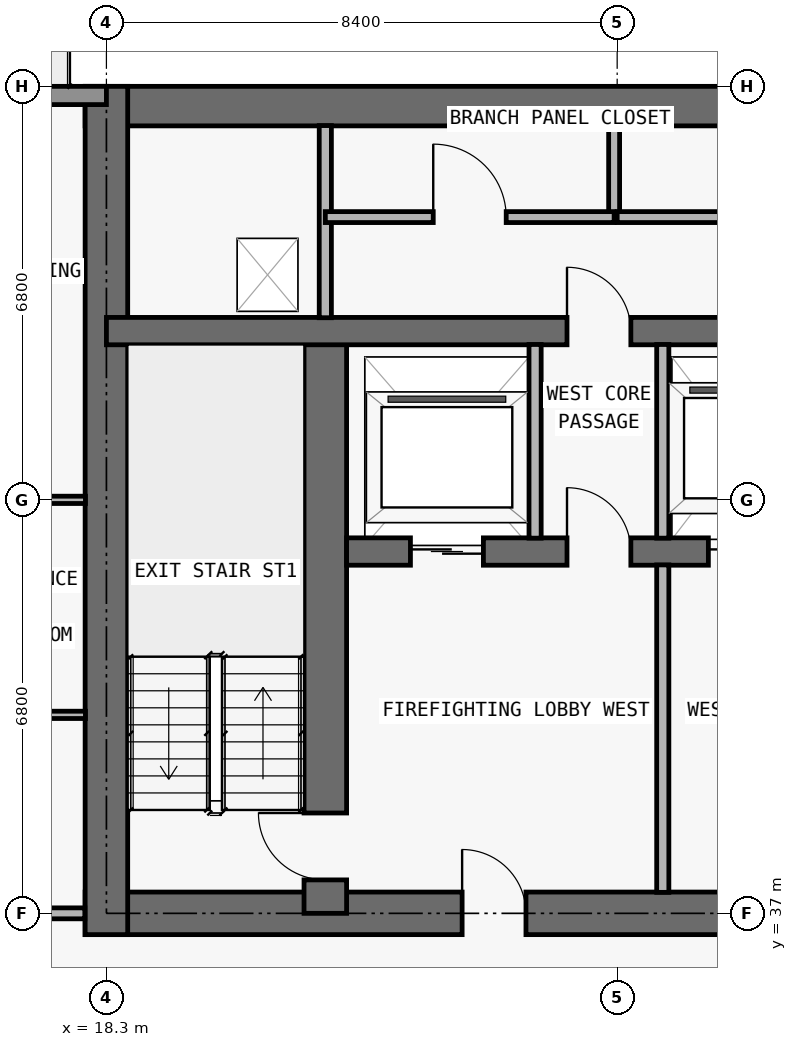
"""IFC4 building model, lengths in metres.
Left out: names, types, materials, properties, quantities, classifications, styles, units other than length and angle.
Written with IfcOpenShell. Run it as: python <this file> out.ifc"""

import sys

from ifc_helpers import new_model, si_unit, direction, frame, frame_2d, origin, place, context, subcontext, project, spatial, rectangle, extrude, element, fill, save


model = new_model("IFC4")
c1 = context("Model", 3, precision=1e-05, world=origin(), true_north=direction((0.0, 1.0)))
c2 = subcontext(c1, "Body", "Model", "MODEL_VIEW")
j1 = project(units=[si_unit("LENGTHUNIT", "METRE"), si_unit("PLANEANGLEUNIT", "RADIAN")], contexts=[c1])
p1 = place(None, origin())
s1 = spatial("IfcSite", under=j1, at=p1, CompositionType="ELEMENT")
p2 = place(p1, origin())
s2 = spatial("IfcBuilding", under=s1, at=p2, CompositionType="ELEMENT")
p3 = place(p2, frame((0.0, 0.0, 229.8)))
s3 = spatial("IfcBuildingStorey", under=s2, at=p3, CompositionType="ELEMENT", Elevation=229.8)
p4 = place(p3, frame((17.95, 37.0, 0.0), z_axis=(0.0, 0.0, 1.0), x_axis=(1.0, 0.0, 0.0)))
e1 = element("IfcWall", 1, at=p4, inside=s3, PredefinedType="SHEAR", context=c2, shape_type="SweptSolid", body=[
    extrude(rectangle(XDim=41.9, YDim=0.7, at=frame_2d((20.95, 0.0))), origin(), (0.0, 0.0, 1.0), 3.05),
])
p5 = place(p4, frame((14.35, 0.0, 0.0)))
e2 = element("IfcOpeningElement", 2, at=p5, cuts=e1, PredefinedType="OPENING", context=c2, shape_type="SweptSolid", body=[
    extrude(rectangle(XDim=1.1, YDim=2.15, at=frame_2d((0.55, 1.075))), frame((0.0, 0.36, 0.0), z_axis=(0.0, -1.0, 0.0), x_axis=(1.0, 0.0, 0.0)), (0.0, 0.0, 1.0), 0.72),
])
p6 = place(p4, frame((6.2, 0.0, 0.0)))
e3 = element("IfcOpeningElement", 3, at=p6, cuts=e1, PredefinedType="OPENING", context=c2, shape_type="SweptSolid", body=[
    extrude(rectangle(XDim=1.05, YDim=2.15, at=frame_2d((0.525, 1.075))), frame((0.0, 0.36, 0.0), z_axis=(0.0, -1.0, 0.0), x_axis=(1.0, 0.0, 0.0)), (0.0, 0.0, 1.0), 0.72),
])
p7 = place(p4, frame((34.7, 0.0, 0.0)))
e4 = element("IfcOpeningElement", 4, at=p7, cuts=e1, PredefinedType="OPENING", context=c2, shape_type="SweptSolid", body=[
    extrude(rectangle(XDim=1.05, YDim=2.15, at=frame_2d((0.525, 1.075))), frame((0.0, 0.36, 0.0), z_axis=(0.0, -1.0, 0.0), x_axis=(1.0, 0.0, 0.0)), (0.0, 0.0, 1.0), 0.72),
])
p8 = place(p4, frame((10.812, 0.0, 0.0)))
e5 = element("IfcOpeningElement", 5, at=p8, cuts=e1, PredefinedType="OPENING", context=c2, shape_type="SweptSolid", body=[
    extrude(rectangle(XDim=1.05, YDim=2.15, at=frame_2d((0.525, 1.075))), frame((0.0, 0.36, 0.0), z_axis=(0.0, -1.0, 0.0), x_axis=(1.0, 0.0, 0.0)), (0.0, 0.0, 1.0), 0.72),
])
p9 = place(p4, frame((24.05, 0.0, 0.0)))
e6 = element("IfcOpeningElement", 6, at=p9, cuts=e1, PredefinedType="OPENING", context=c2, shape_type="SweptSolid", body=[
    extrude(rectangle(XDim=1.05, YDim=2.15, at=frame_2d((0.525, 1.075))), frame((0.0, 0.36, 0.0), z_axis=(0.0, -1.0, 0.0), x_axis=(1.0, 0.0, 0.0)), (0.0, 0.0, 1.0), 0.72),
])
p10 = place(p3, frame((17.95, 50.275, 0.0), z_axis=(0.0, 0.0, 1.0), x_axis=(1.0, 0.0, 0.0)))
e7 = element("IfcWall", 7, at=p10, inside=s3, PredefinedType="SHEAR", context=c2, shape_type="SweptSolid", body=[
    extrude(rectangle(XDim=41.9, YDim=0.65, at=frame_2d((20.95, 0.0))), origin(), (0.0, 0.0, 1.0), 3.05),
])
p11 = place(p3, frame((18.3, 36.65, 0.0), z_axis=(0.0, 0.0, 1.0), x_axis=(0.0, 1.0, 0.0)))
e8 = element("IfcWall", 8, at=p11, inside=s3, PredefinedType="SHEAR", context=c2, shape_type="SweptSolid", body=[
    extrude(rectangle(XDim=13.95, YDim=0.7, at=frame_2d((6.975, 0.0))), origin(), (0.0, 0.0, 1.0), 3.05),
])
p12 = place(p3, frame((21.9, 37.0, 0.0), z_axis=(0.0, 0.0, 1.0), x_axis=(0.0, 1.0, 0.0)))
e9 = element("IfcWall", 9, at=p12, inside=s3, PredefinedType="SHEAR", context=c2, shape_type="SweptSolid", body=[
    extrude(rectangle(XDim=9.575, YDim=0.7, at=frame_2d((4.788, 0.0))), origin(), (0.0, 0.0, 1.0), 3.05),
])
p13 = place(p12, frame((0.55, 0.0, 0.0)))
e10 = element("IfcOpeningElement", 10, at=p13, cuts=e9, PredefinedType="OPENING", context=c2, shape_type="SweptSolid", body=[
    extrude(rectangle(XDim=1.1, YDim=2.15, at=frame_2d((0.55, 1.075))), frame((0.0, 0.36, 0.0), z_axis=(0.0, -1.0, 0.0), x_axis=(1.0, 0.0, 0.0)), (0.0, 0.0, 1.0), 0.72),
])
p14 = place(p3, frame((22.25, 42.95, 0.0), z_axis=(0.0, 0.0, 1.0), x_axis=(1.0, 0.0, 0.0)))
e11 = element("IfcWall", 11, at=p14, inside=s3, PredefinedType="SHEAR", context=c2, shape_type="SweptSolid", body=[
    extrude(rectangle(XDim=33.3, YDim=0.45, at=frame_2d((16.65, 0.0))), origin(), (0.0, 0.0, 1.0), 3.05),
])
p15 = place(p14, frame((1.05, 0.0, 0.0)))
e12 = element("IfcOpeningElement", 12, at=p15, cuts=e11, PredefinedType="OPENING", context=c2, shape_type="SweptSolid", body=[
    extrude(rectangle(XDim=1.2, YDim=2.2, at=frame_2d((0.6, 1.1))), frame((0.0, 0.235, 0.0), z_axis=(0.0, -1.0, 0.0), x_axis=(1.0, 0.0, 0.0)), (0.0, 0.0, 1.0), 0.47),
])
p16 = place(p14, frame((31.05, 0.0, 0.0)))
e13 = element("IfcOpeningElement", 13, at=p16, cuts=e11, PredefinedType="OPENING", context=c2, shape_type="SweptSolid", body=[
    extrude(rectangle(XDim=1.2, YDim=2.2, at=frame_2d((0.6, 1.1))), frame((0.0, 0.235, 0.0), z_axis=(0.0, -1.0, 0.0), x_axis=(1.0, 0.0, 0.0)), (0.0, 0.0, 1.0), 0.47),
])
p17 = place(p14, frame((26.45, 0.0, 0.0)))
e14 = element("IfcOpeningElement", 14, at=p17, cuts=e11, PredefinedType="OPENING", context=c2, shape_type="SweptSolid", body=[
    extrude(rectangle(XDim=1.1, YDim=2.2, at=frame_2d((0.55, 1.1))), frame((0.0, 0.235, 0.0), z_axis=(0.0, -1.0, 0.0), x_axis=(1.0, 0.0, 0.0)), (0.0, 0.0, 1.0), 0.47),
])
p18 = place(p14, frame((5.95, 0.0, 0.0)))
e15 = element("IfcOpeningElement", 15, at=p18, cuts=e11, PredefinedType="OPENING", context=c2, shape_type="SweptSolid", body=[
    extrude(rectangle(XDim=1.1, YDim=2.2, at=frame_2d((0.55, 1.1))), frame((0.0, 0.235, 0.0), z_axis=(0.0, -1.0, 0.0), x_axis=(1.0, 0.0, 0.0)), (0.0, 0.0, 1.0), 0.47),
])
p19 = place(p14, frame((3.625, 0.0, 0.0)))
e16 = element("IfcOpeningElement", 16, at=p19, cuts=e11, PredefinedType="OPENING", context=c2, shape_type="SweptSolid", body=[
    extrude(rectangle(XDim=1.05, YDim=2.15, at=frame_2d((0.525, 1.075))), frame((0.0, 0.235, 0.0), z_axis=(0.0, -1.0, 0.0), x_axis=(1.0, 0.0, 0.0)), (0.0, 0.0, 1.0), 0.47),
])
p20 = place(p14, frame((28.675, 0.0, 0.0)))
e17 = element("IfcOpeningElement", 17, at=p20, cuts=e11, PredefinedType="OPENING", context=c2, shape_type="SweptSolid", body=[
    extrude(rectangle(XDim=1.05, YDim=2.15, at=frame_2d((0.525, 1.075))), frame((0.0, 0.235, 0.0), z_axis=(0.0, -1.0, 0.0), x_axis=(1.0, 0.0, 0.0)), (0.0, 0.0, 1.0), 0.47),
])
p21 = place(p14, frame((15.225, 0.0, 0.0)))
e18 = element("IfcOpeningElement", 18, at=p21, cuts=e11, PredefinedType="OPENING", context=c2, shape_type="SweptSolid", body=[
    extrude(rectangle(XDim=1.0, YDim=2.2, at=frame_2d((0.5, 1.1))), frame((0.0, 0.235, 0.0), z_axis=(0.0, -1.0, 0.0), x_axis=(1.0, 0.0, 0.0)), (0.0, 0.0, 1.0), 0.47),
])
p22 = place(p14, frame((21.975, 0.0, 0.0)))
e19 = element("IfcOpeningElement", 19, at=p22, cuts=e11, PredefinedType="OPENING", context=c2, shape_type="SweptSolid", body=[
    extrude(rectangle(XDim=1.0, YDim=2.2, at=frame_2d((0.5, 1.1))), frame((0.0, 0.235, 0.0), z_axis=(0.0, -1.0, 0.0), x_axis=(1.0, 0.0, 0.0)), (0.0, 0.0, 1.0), 0.47),
])
p23 = place(p3, frame((18.3, 46.575, 0.0), z_axis=(0.0, 0.0, 1.0), x_axis=(1.0, 0.0, 0.0)))
e20 = element("IfcWall", 20, at=p23, inside=s3, PredefinedType="SHEAR", context=c2, shape_type="SweptSolid", body=[
    extrude(rectangle(XDim=41.2, YDim=0.45, at=frame_2d((20.6, 0.0))), origin(), (0.0, 0.0, 1.0), 3.05),
])
p24 = place(p23, frame((7.575, 0.0, 0.0)))
e21 = element("IfcOpeningElement", 21, at=p24, cuts=e20, PredefinedType="OPENING", context=c2, shape_type="SweptSolid", body=[
    extrude(rectangle(XDim=1.05, YDim=2.15, at=frame_2d((0.525, 1.075))), frame((0.0, 0.235, 0.0), z_axis=(0.0, -1.0, 0.0), x_axis=(1.0, 0.0, 0.0)), (0.0, 0.0, 1.0), 0.47),
])
p25 = place(p23, frame((32.625, 0.0, 0.0)))
e22 = element("IfcOpeningElement", 22, at=p25, cuts=e20, PredefinedType="OPENING", context=c2, shape_type="SweptSolid", body=[
    extrude(rectangle(XDim=1.05, YDim=2.15, at=frame_2d((0.525, 1.075))), frame((0.0, 0.235, 0.0), z_axis=(0.0, -1.0, 0.0), x_axis=(1.0, 0.0, 0.0)), (0.0, 0.0, 1.0), 0.47),
])
p26 = place(p3, frame((12.1, 50.45, 0.0), z_axis=(0.0, 0.0, 1.0), x_axis=(1.0, 0.0, 0.0)))
e23 = element("IfcWall", 23, at=p26, inside=s3, PredefinedType="STANDARD", context=c2, shape_type="SweptSolid", body=[
    extrude(rectangle(XDim=6.2, YDim=0.3, at=frame_2d((3.1, 0.0))), origin(), (0.0, 0.0, 1.0), 3.05),
])
p27 = place(p26, frame((2.1, 0.0, 0.0)))
e24 = element("IfcOpeningElement", 24, at=p27, cuts=e23, PredefinedType="OPENING", context=c2, shape_type="SweptSolid", body=[
    extrude(rectangle(XDim=2.0, YDim=2.3, at=frame_2d((1.0, 1.15))), frame((0.0, 0.16, 0.0), z_axis=(0.0, -1.0, 0.0), x_axis=(1.0, 0.0, 0.0)), (0.0, 0.0, 1.0), 0.32),
])
p28 = place(p3, frame((21.9, 46.795, 0.0), z_axis=(0.0, 0.0, 1.0), x_axis=(0.0, 1.0, 0.0)))
e25 = element("IfcWall", 25, at=p28, inside=s3, PredefinedType="PARTITIONING", context=c2, shape_type="SweptSolid", body=[
    extrude(rectangle(XDim=3.16, YDim=0.2, at=frame_2d((1.58, 0.0))), origin(), (0.0, 0.0, 1.0), 3.05),
])
p29 = place(p3, frame((25.35, 43.17, 0.0), z_axis=(0.0, 0.0, 1.0), x_axis=(0.0, 1.0, 0.0)))
e26 = element("IfcWall", 26, at=p29, inside=s3, PredefinedType="PARTITIONING", context=c2, shape_type="SweptSolid", body=[
    extrude(rectangle(XDim=3.185, YDim=0.2, at=frame_2d((1.593, 0.0))), origin(), (0.0, 0.0, 1.0), 3.05),
])
p30 = place(p3, frame((26.65, 48.45, 0.0), z_axis=(0.0, 0.0, 1.0), x_axis=(0.0, 1.0, 0.0)))
e27 = element("IfcWall", 27, at=p30, inside=s3, PredefinedType="PARTITIONING", context=c2, shape_type="SweptSolid", body=[
    extrude(rectangle(XDim=1.505, YDim=0.18, at=frame_2d((0.752, 0.0))), origin(), (0.0, 0.0, 1.0), 3.05),
])
p31 = place(p3, frame((27.45, 37.345, 0.0), z_axis=(0.0, 0.0, 1.0), x_axis=(0.0, 1.0, 0.0)))
e28 = element("IfcWall", 28, at=p31, inside=s3, PredefinedType="PARTITIONING", context=c2, shape_type="SweptSolid", body=[
    extrude(rectangle(XDim=5.385, YDim=0.2, at=frame_2d((2.692, 0.0))), origin(), (0.0, 0.0, 1.0), 3.05),
])
p32 = place(p3, frame((27.45, 43.17, 0.0), z_axis=(0.0, 0.0, 1.0), x_axis=(0.0, 1.0, 0.0)))
e29 = element("IfcWall", 29, at=p32, inside=s3, PredefinedType="PARTITIONING", context=c2, shape_type="SweptSolid", body=[
    extrude(rectangle(XDim=3.185, YDim=0.2, at=frame_2d((1.593, 0.0))), origin(), (0.0, 0.0, 1.0), 3.05),
])
p33 = place(p3, frame((12.1, 37.0, 0.0), z_axis=(0.0, 0.0, 1.0), x_axis=(1.0, 0.0, 0.0)))
e30 = element("IfcWall", 30, at=p33, inside=s3, PredefinedType="PARTITIONING", context=c2, shape_type="SweptSolid", body=[
    extrude(rectangle(XDim=5.845, YDim=0.18, at=frame_2d((2.922, 0.0))), origin(), (0.0, 0.0, 1.0), 3.05),
])
p34 = place(p33, frame((1.275, 0.0, 0.0)))
e31 = element("IfcOpeningElement", 31, at=p34, cuts=e30, PredefinedType="OPENING", context=c2, shape_type="SweptSolid", body=[
    extrude(rectangle(XDim=1.0, YDim=2.2, at=frame_2d((0.5, 1.1))), frame((0.0, 0.1, 0.0), z_axis=(0.0, -1.0, 0.0), x_axis=(1.0, 0.0, 0.0)), (0.0, 0.0, 1.0), 0.2),
])
p35 = place(p3, frame((15.65, 40.264, 0.0), z_axis=(0.0, 0.0, 1.0), x_axis=(1.0, 0.0, 0.0)))
e32 = element("IfcWall", 32, at=p35, inside=s3, PredefinedType="PARTITIONING", context=c2, shape_type="SweptSolid", body=[
    extrude(rectangle(XDim=2.305, YDim=0.12, at=frame_2d((1.153, 0.0))), origin(), (0.0, 0.0, 1.0), 3.05),
])
p36 = place(p3, frame((8.395, 43.8, 0.0), z_axis=(0.0, 0.0, 1.0), x_axis=(1.0, 0.0, 0.0)))
e33 = element("IfcWall", 33, at=p36, inside=s3, PredefinedType="PARTITIONING", context=c2, shape_type="SweptSolid", body=[
    extrude(rectangle(XDim=9.56, YDim=0.12, at=frame_2d((4.78, 0.0))), origin(), (0.0, 0.0, 1.0), 2.418),
])
p37 = place(p36, frame((5.03, 0.0, 0.0)))
e34 = element("IfcOpeningElement", 34, at=p37, cuts=e33, PredefinedType="OPENING", context=c2, shape_type="SweptSolid", body=[
    extrude(rectangle(XDim=0.9, YDim=2.15, at=frame_2d((0.45, 1.075))), frame((0.0, 0.07, 0.0), z_axis=(0.0, -1.0, 0.0), x_axis=(1.0, 0.0, 0.0)), (0.0, 0.0, 1.0), 0.14),
])
p38 = place(p36, frame((7.982, 0.0, 0.0)))
e35 = element("IfcOpeningElement", 35, at=p38, cuts=e33, PredefinedType="OPENING", context=c2, shape_type="SweptSolid", body=[
    extrude(rectangle(XDim=0.85, YDim=2.1, at=frame_2d((0.425, 1.05))), frame((0.0, 0.07, 0.0), z_axis=(0.0, -1.0, 0.0), x_axis=(1.0, 0.0, 0.0)), (0.0, 0.0, 1.0), 0.14),
])
p39 = place(p3, frame((21.9, 48.45, 0.0), z_axis=(0.0, 0.0, 1.0), x_axis=(1.0, 0.0, 0.0)))
e36 = element("IfcWall", 36, at=p39, inside=s3, PredefinedType="PARTITIONING", context=c2, shape_type="SweptSolid", body=[
    extrude(rectangle(XDim=4.75, YDim=0.18, at=frame_2d((2.375, 0.0))), origin(), (0.0, 0.0, 1.0), 3.05),
])
p40 = place(p39, frame((1.775, 0.0, 0.0)))
e37 = element("IfcOpeningElement", 37, at=p40, cuts=e36, PredefinedType="OPENING", context=c2, shape_type="SweptSolid", body=[
    extrude(rectangle(XDim=1.2, YDim=2.2, at=frame_2d((0.6, 1.1))), frame((0.0, 0.1, 0.0), z_axis=(0.0, -1.0, 0.0), x_axis=(1.0, 0.0, 0.0)), (0.0, 0.0, 1.0), 0.2),
])
p41 = place(p3, frame((26.7, 48.45, 0.0), z_axis=(0.0, 0.0, 1.0), x_axis=(1.0, 0.0, 0.0)))
e38 = element("IfcWall", 38, at=p41, inside=s3, PredefinedType="PARTITIONING", context=c2, shape_type="SweptSolid", body=[
    extrude(rectangle(XDim=12.504, YDim=0.18, at=frame_2d((6.252, 0.0))), origin(), (0.0, 0.0, 1.0), 3.05),
])
p42 = place(p41, frame((1.75, 0.0, 0.0)))
e39 = element("IfcOpeningElement", 39, at=p42, cuts=e38, PredefinedType="OPENING", context=c2, shape_type="SweptSolid", body=[
    extrude(rectangle(XDim=1.2, YDim=2.2, at=frame_2d((0.6, 1.1))), frame((0.0, 0.1, 0.0), z_axis=(0.0, -1.0, 0.0), x_axis=(1.0, 0.0, 0.0)), (0.0, 0.0, 1.0), 0.2),
])
p43 = place(p41, frame((6.475, 0.0, 0.0)))
e40 = element("IfcOpeningElement", 40, at=p43, cuts=e38, PredefinedType="OPENING", context=c2, shape_type="SweptSolid", body=[
    extrude(rectangle(XDim=1.2, YDim=2.2, at=frame_2d((0.6, 1.1))), frame((0.0, 0.1, 0.0), z_axis=(0.0, -1.0, 0.0), x_axis=(1.0, 0.0, 0.0)), (0.0, 0.0, 1.0), 0.2),
])
p44 = place(p15, origin())
e41 = element("IfcDoor", 41, at=p44, inside=s3, OperationType="DOUBLE_DOOR_SLIDING", PredefinedType="DOOR", context=c2, shape_type="SweptSolid", body=[
    extrude(rectangle(XDim=1.2, YDim=2.2, at=frame_2d((0.6, 1.1))), frame((0.0, 0.025, 0.0), z_axis=(0.0, -1.0, 0.0), x_axis=(1.0, 0.0, 0.0)), (0.0, 0.0, 1.0), 0.05),
])
fill(e12, e41)
p45 = place(p18, origin())
e42 = element("IfcDoor", 42, at=p45, inside=s3, OperationType="DOUBLE_DOOR_SLIDING", PredefinedType="DOOR", context=c2, shape_type="SweptSolid", body=[
    extrude(rectangle(XDim=1.1, YDim=2.2, at=frame_2d((0.55, 1.1))), frame((0.0, 0.025, 0.0), z_axis=(0.0, -1.0, 0.0), x_axis=(1.0, 0.0, 0.0)), (0.0, 0.0, 1.0), 0.05),
])
fill(e15, e42)
p46 = place(p6, origin())
e43 = element("IfcDoor", 43, at=p46, inside=s3, OperationType="SINGLE_SWING_LEFT", PredefinedType="DOOR", context=c2, shape_type="SweptSolid", body=[
    extrude(rectangle(XDim=1.05, YDim=2.15, at=frame_2d((0.525, 1.075))), frame((0.0, 0.025, 0.0), z_axis=(0.0, -1.0, 0.0), x_axis=(1.0, 0.0, 0.0)), (0.0, 0.0, 1.0), 0.05),
])
fill(e3, e43)
p47 = place(p13, origin())
e44 = element("IfcDoor", 44, at=p47, inside=s3, OperationType="SINGLE_SWING_RIGHT", PredefinedType="DOOR", context=c2, shape_type="SweptSolid", body=[
    extrude(rectangle(XDim=1.1, YDim=2.15, at=frame_2d((0.55, 1.075))), frame((0.0, 0.025, 0.0), z_axis=(0.0, -1.0, 0.0), x_axis=(1.0, 0.0, 0.0)), (0.0, 0.0, 1.0), 0.05),
])
fill(e10, e44)
p48 = place(p19, origin())
e45 = element("IfcDoor", 45, at=p48, inside=s3, OperationType="SINGLE_SWING_LEFT", PredefinedType="DOOR", context=c2, shape_type="SweptSolid", body=[
    extrude(rectangle(XDim=1.05, YDim=2.15, at=frame_2d((0.525, 1.075))), frame((0.0, 0.025, 0.0), z_axis=(0.0, -1.0, 0.0), x_axis=(1.0, 0.0, 0.0)), (0.0, 0.0, 1.0), 0.05),
])
fill(e16, e45)
p49 = place(p24, origin())
e46 = element("IfcDoor", 46, at=p49, inside=s3, OperationType="SINGLE_SWING_LEFT", PredefinedType="DOOR", context=c2, shape_type="SweptSolid", body=[
    extrude(rectangle(XDim=1.05, YDim=2.15, at=frame_2d((0.525, 1.075))), frame((0.0, 0.025, 0.0), z_axis=(0.0, -1.0, 0.0), x_axis=(1.0, 0.0, 0.0)), (0.0, 0.0, 1.0), 0.05),
])
fill(e21, e46)
p50 = place(p40, origin())
e47 = element("IfcDoor", 47, at=p50, inside=s3, OperationType="SINGLE_SWING_LEFT", PredefinedType="DOOR", context=c2, shape_type="SweptSolid", body=[
    extrude(rectangle(XDim=1.2, YDim=2.2, at=frame_2d((0.6, 1.1))), frame((0.0, 0.025, 0.0), z_axis=(0.0, -1.0, 0.0), x_axis=(1.0, 0.0, 0.0)), (0.0, 0.0, 1.0), 0.05),
])
fill(e37, e47)
save(model, sys.argv[1])
